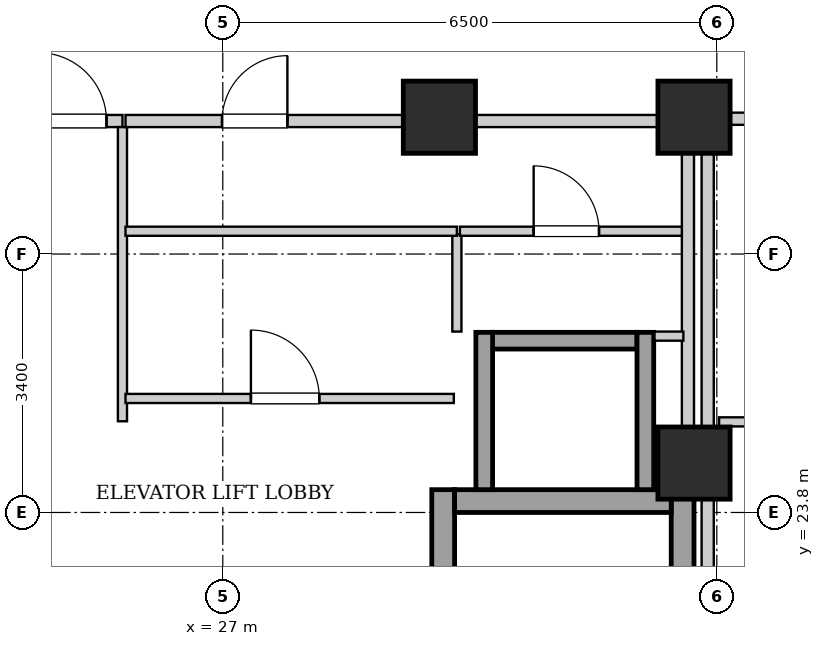
"""IFC4 building model, lengths in metres.
Left out: names, types, materials, properties, quantities, classifications, styles, units other than length and angle.
Written with IfcOpenShell. Run it as: python <this file> out.ifc"""

import sys

from ifc_helpers import new_model, si_unit, direction, frame, frame_2d, origin, origin_2d, place, context, subcontext, project, spatial, rectangle, extrude, element, fill, save


model = new_model("IFC4")
c1 = context("Model", 3, precision=1e-05, world=origin(), true_north=direction((0.0, 1.0)))
c2 = subcontext(c1, "Body", "Model", "MODEL_VIEW")
j1 = project(units=[si_unit("LENGTHUNIT", "METRE"), si_unit("PLANEANGLEUNIT", "RADIAN")], contexts=[c1])
p1 = place(None, origin())
s1 = spatial("IfcSite", under=j1, at=p1, CompositionType="ELEMENT")
p2 = place(p1, origin())
s2 = spatial("IfcBuilding", under=s1, at=p2, CompositionType="ELEMENT")
p3 = place(p2, frame((0.0, 0.0, 137.4)))
s3 = spatial("IfcBuildingStorey", under=s2, at=p3, CompositionType="ELEMENT", Elevation=137.4)
for number, where, z_axis, x_axis in (
    (1, (29.85, 29.0, 0.0), (0.0, 0.0, 1.0), (1.0, 0.0, 0.0)),
    (2, (33.2, 29.0, 0.0), (0.0, 0.0, 1.0), (1.0, 0.0, 0.0)),
    (3, (33.2, 24.45, 0.0), (0.0, 0.0, 1.0), (1.0, 0.0, 0.0)),
):
    element("IfcColumn", number, at=place(p3, frame(where, z_axis=z_axis, x_axis=x_axis)), inside=s3, PredefinedType="COLUMN", context=c2, shape_type="SweptSolid", body=[
        extrude(rectangle(XDim=0.95, YDim=0.95, at=origin_2d()), origin(), (0.0, 0.0, 1.0), 3.25),
    ])
for number, where, z_axis, x_axis in (
    (4, (29.9, 15.1, 0.0), (0.0, 0.0, 1.0), (0.0, 1.0, 0.0)),
    (5, (33.05, 15.1, 0.0), (0.0, 0.0, 1.0), (0.0, 1.0, 0.0)),
):
    element("IfcWall", number, at=place(p3, frame(where, z_axis=z_axis, x_axis=x_axis)), inside=s3, PredefinedType="SHEAR", context=c2, shape_type="SweptSolid", body=[
        extrude(rectangle(XDim=9.0, YDim=0.3, at=frame_2d((4.5, 0.0))), origin(), (0.0, 0.0, 1.0), 2.99),
    ])
p4 = place(p3, frame((30.05, 23.95, 0.0), z_axis=(0.0, 0.0, 1.0), x_axis=(1.0, 0.0, 0.0)))
e6 = element("IfcWall", 6, at=p4, inside=s3, PredefinedType="SHEAR", context=c2, shape_type="SweptSolid", body=[
    extrude(rectangle(XDim=2.85, YDim=0.3, at=frame_2d((1.425, 0.0))), origin(), (0.0, 0.0, 1.0), 2.99),
])
p5 = place(p3, frame((30.55, 26.06, 0.0), z_axis=(0.0, 0.0, 1.0), x_axis=(1.0, 0.0, 0.0)))
e7 = element("IfcWall", 7, at=p5, inside=s3, PredefinedType="SHEAR", context=c2, shape_type="SweptSolid", body=[
    extrude(rectangle(XDim=1.9, YDim=0.22, at=frame_2d((0.95, 0.0))), origin(), (0.0, 0.0, 1.0), 2.99),
])
for number, where, z_axis, x_axis in (
    (8, (30.44, 24.1, 0.0), (0.0, 0.0, 1.0), (0.0, 1.0, 0.0)),
    (9, (32.56, 24.1, 0.0), (0.0, 0.0, 1.0), (0.0, 1.0, 0.0)),
):
    element("IfcWall", number, at=place(p3, frame(where, z_axis=z_axis, x_axis=x_axis)), inside=s3, PredefinedType="SHEAR", context=c2, shape_type="SweptSolid", body=[
        extrude(rectangle(XDim=2.07, YDim=0.22, at=frame_2d((1.035, 0.0))), origin(), (0.0, 0.0, 1.0), 2.99),
    ])
p6 = place(p3, frame((33.12, 24.12, 0.0), z_axis=(0.0, 0.0, 1.0), x_axis=(0.0, 1.0, 0.0)))
e10 = element("IfcWall", 10, at=p6, inside=s3, PredefinedType="PARTITIONING", context=c2, shape_type="SweptSolid", body=[
    extrude(rectangle(XDim=4.76, YDim=0.16, at=frame_2d((2.38, 0.0))), origin(), (0.0, 0.0, 1.0), 2.325),
])
p7 = place(p3, frame((24.36, 28.95, 0.0), z_axis=(0.0, 0.0, 1.0), x_axis=(1.0, 0.0, 0.0)))
e11 = element("IfcWall", 11, at=p7, inside=s3, PredefinedType="PARTITIONING", context=c2, shape_type="SweptSolid", body=[
    extrude(rectangle(XDim=1.32, YDim=0.16, at=frame_2d((0.66, 0.0))), origin(), (0.0, 0.0, 1.0), 2.426),
])
p8 = place(p7, frame((0.21, 0.0, 0.0)))
e12 = element("IfcOpeningElement", 12, at=p8, cuts=e11, PredefinedType="OPENING", context=c2, shape_type="SweptSolid", body=[
    extrude(rectangle(XDim=0.9, YDim=2.05, at=frame_2d((0.45, 1.025))), frame((0.0, 0.09, 0.0), z_axis=(0.0, -1.0, 0.0), x_axis=(1.0, 0.0, 0.0)), (0.0, 0.0, 1.0), 0.18),
])
p9 = place(p3, frame((25.68, 25.0, 0.0), z_axis=(0.0, 0.0, 1.0), x_axis=(0.0, 1.0, 0.0)))
e13 = element("IfcWall", 13, at=p9, inside=s3, PredefinedType="PARTITIONING", context=c2, shape_type="SweptSolid", body=[
    extrude(rectangle(XDim=3.87, YDim=0.12, at=frame_2d((1.935, 0.0))), origin(), (0.0, 0.0, 1.0), 2.99),
])
p10 = place(p3, frame((30.08, 26.18, 0.0), z_axis=(0.0, 0.0, 1.0), x_axis=(0.0, 1.0, 0.0)))
e14 = element("IfcWall", 14, at=p10, inside=s3, PredefinedType="PARTITIONING", context=c2, shape_type="SweptSolid", body=[
    extrude(rectangle(XDim=1.28, YDim=0.12, at=frame_2d((0.64, 0.0))), origin(), (0.0, 0.0, 1.0), 2.99),
])
p11 = place(p3, frame((32.68, 26.12, 0.0), z_axis=(0.0, 0.0, 1.0), x_axis=(1.0, 0.0, 0.0)))
e15 = element("IfcWall", 15, at=p11, inside=s3, PredefinedType="PARTITIONING", context=c2, shape_type="SweptSolid", body=[
    extrude(rectangle(XDim=0.38, YDim=0.12, at=frame_2d((0.19, 0.0))), origin(), (0.0, 0.0, 1.0), 2.99),
])
p12 = place(p3, frame((30.12, 27.5, 0.0), z_axis=(0.0, 0.0, 1.0), x_axis=(1.0, 0.0, 0.0)))
e16 = element("IfcWall", 16, at=p12, inside=s3, PredefinedType="PARTITIONING", context=c2, shape_type="SweptSolid", body=[
    extrude(rectangle(XDim=2.92, YDim=0.12, at=frame_2d((1.46, 0.0))), origin(), (0.0, 0.0, 1.0), 2.99),
])
p13 = place(p12, frame((0.97, 0.0, 0.0)))
e17 = element("IfcOpeningElement", 17, at=p13, cuts=e16, PredefinedType="OPENING", context=c2, shape_type="SweptSolid", body=[
    extrude(rectangle(XDim=0.86, YDim=2.05, at=frame_2d((0.43, 1.025))), frame((0.0, 0.07, 0.0), z_axis=(0.0, -1.0, 0.0), x_axis=(1.0, 0.0, 0.0)), (0.0, 0.0, 1.0), 0.14),
])
p14 = place(p3, frame((25.72, 27.5, 0.0), z_axis=(0.0, 0.0, 1.0), x_axis=(1.0, 0.0, 0.0)))
e18 = element("IfcWall", 18, at=p14, inside=s3, PredefinedType="PARTITIONING", context=c2, shape_type="SweptSolid", body=[
    extrude(rectangle(XDim=4.36, YDim=0.12, at=frame_2d((2.18, 0.0))), origin(), (0.0, 0.0, 1.0), 2.99),
])
p15 = place(p3, frame((25.72, 25.3, 0.0), z_axis=(0.0, 0.0, 1.0), x_axis=(1.0, 0.0, 0.0)))
e19 = element("IfcWall", 19, at=p15, inside=s3, PredefinedType="PARTITIONING", context=c2, shape_type="SweptSolid", body=[
    extrude(rectangle(XDim=4.32, YDim=0.12, at=frame_2d((2.16, 0.0))), origin(), (0.0, 0.0, 1.0), 2.99),
])
p16 = place(p15, frame((1.65, 0.0, 0.0)))
e20 = element("IfcOpeningElement", 20, at=p16, cuts=e19, PredefinedType="OPENING", context=c2, shape_type="SweptSolid", body=[
    extrude(rectangle(XDim=0.9, YDim=2.05, at=frame_2d((0.45, 1.025))), frame((0.0, 0.07, 0.0), z_axis=(0.0, -1.0, 0.0), x_axis=(1.0, 0.0, 0.0)), (0.0, 0.0, 1.0), 0.14),
])
p17 = place(p3, frame((25.72, 28.95, 0.0), z_axis=(0.0, 0.0, 1.0), x_axis=(1.0, 0.0, 0.0)))
e21 = element("IfcWall", 21, at=p17, inside=s3, PredefinedType="PARTITIONING", context=c2, shape_type="SweptSolid", body=[
    extrude(rectangle(XDim=7.32, YDim=0.16, at=frame_2d((3.66, 0.0))), origin(), (0.0, 0.0, 1.0), 2.426),
])
p18 = place(p17, frame((1.27, 0.0, 0.0)))
e22 = element("IfcOpeningElement", 22, at=p18, cuts=e21, PredefinedType="OPENING", context=c2, shape_type="SweptSolid", body=[
    extrude(rectangle(XDim=0.86, YDim=2.05, at=frame_2d((0.43, 1.025))), frame((0.0, 0.09, 0.0), z_axis=(0.0, -1.0, 0.0), x_axis=(1.0, 0.0, 0.0)), (0.0, 0.0, 1.0), 0.18),
])
p19 = place(p3, frame((33.38, 28.98, 0.0), z_axis=(0.0, 0.0, 1.0), x_axis=(1.0, 0.0, 0.0)))
e23 = element("IfcWall", 23, at=p19, inside=s3, PredefinedType="PARTITIONING", context=c2, shape_type="SweptSolid", body=[
    extrude(rectangle(XDim=6.64, YDim=0.16, at=frame_2d((3.32, 0.0))), origin(), (0.0, 0.0, 1.0), 2.426),
])
p20 = place(p19, frame((0.9, 0.0, 0.0)))
e24 = element("IfcOpeningElement", 24, at=p20, cuts=e23, PredefinedType="OPENING", context=c2, shape_type="SweptSolid", body=[
    extrude(rectangle(XDim=0.95, YDim=2.1, at=frame_2d((0.475, 1.05))), frame((0.0, 0.09, 0.0), z_axis=(0.0, -1.0, 0.0), x_axis=(1.0, 0.0, 0.0)), (0.0, 0.0, 1.0), 0.18),
])
p21 = place(p3, frame((33.53, 24.992, 0.0), z_axis=(0.0, 0.0, 1.0), x_axis=(1.0, 0.0, 0.0)))
e25 = element("IfcWall", 25, at=p21, inside=s3, PredefinedType="PARTITIONING", context=c2, shape_type="SweptSolid", body=[
    extrude(rectangle(XDim=2.45, YDim=0.12, at=frame_2d((1.225, 0.0))), origin(), (0.0, 0.0, 1.0), 2.99),
])
p22 = place(p21, frame((0.795, 0.0, 0.0)))
e26 = element("IfcOpeningElement", 26, at=p22, cuts=e25, PredefinedType="OPENING", context=c2, shape_type="SweptSolid", body=[
    extrude(rectangle(XDim=0.86, YDim=2.05, at=frame_2d((0.43, 1.025))), frame((0.0, 0.07, 0.0), z_axis=(0.0, -1.0, 0.0), x_axis=(1.0, 0.0, 0.0)), (0.0, 0.0, 1.0), 0.14),
])
p23 = place(p3, frame((33.38, 15.02, 0.0), z_axis=(0.0, 0.0, 1.0), x_axis=(0.0, 1.0, 0.0)))
e27 = element("IfcWall", 27, at=p23, inside=s3, PredefinedType="PARTITIONING", context=c2, shape_type="SweptSolid", body=[
    extrude(rectangle(XDim=13.98, YDim=0.16, at=frame_2d((6.99, 0.0))), origin(), (0.0, 0.0, 1.0), 2.325),
])
p24 = place(p8, origin())
e28 = element("IfcDoor", 28, at=p24, inside=s3, OperationType="SINGLE_SWING_LEFT", PredefinedType="DOOR", context=c2, shape_type="SweptSolid", body=[
    extrude(rectangle(XDim=0.9, YDim=2.05, at=frame_2d((0.45, 1.025))), frame((0.0, 0.025, 0.0), z_axis=(0.0, -1.0, 0.0), x_axis=(1.0, 0.0, 0.0)), (0.0, 0.0, 1.0), 0.05),
])
fill(e12, e28)
p25 = place(p13, origin())
e29 = element("IfcDoor", 29, at=p25, inside=s3, OperationType="SINGLE_SWING_LEFT", PredefinedType="DOOR", context=c2, shape_type="SweptSolid", body=[
    extrude(rectangle(XDim=0.86, YDim=2.05, at=frame_2d((0.43, 1.025))), frame((0.0, 0.025, 0.0), z_axis=(0.0, -1.0, 0.0), x_axis=(1.0, 0.0, 0.0)), (0.0, 0.0, 1.0), 0.05),
])
fill(e17, e29)
p26 = place(p16, origin())
e30 = element("IfcDoor", 30, at=p26, inside=s3, OperationType="SINGLE_SWING_LEFT", PredefinedType="DOOR", context=c2, shape_type="SweptSolid", body=[
    extrude(rectangle(XDim=0.9, YDim=2.05, at=frame_2d((0.45, 1.025))), frame((0.0, 0.025, 0.0), z_axis=(0.0, -1.0, 0.0), x_axis=(1.0, 0.0, 0.0)), (0.0, 0.0, 1.0), 0.05),
])
fill(e20, e30)
p27 = place(p18, origin())
e31 = element("IfcDoor", 31, at=p27, inside=s3, OperationType="SINGLE_SWING_RIGHT", PredefinedType="DOOR", context=c2, shape_type="SweptSolid", body=[
    extrude(rectangle(XDim=0.86, YDim=2.05, at=frame_2d((0.43, 1.025))), frame((0.0, 0.025, 0.0), z_axis=(0.0, -1.0, 0.0), x_axis=(1.0, 0.0, 0.0)), (0.0, 0.0, 1.0), 0.05),
])
fill(e22, e31)
save(model, sys.argv[1])
